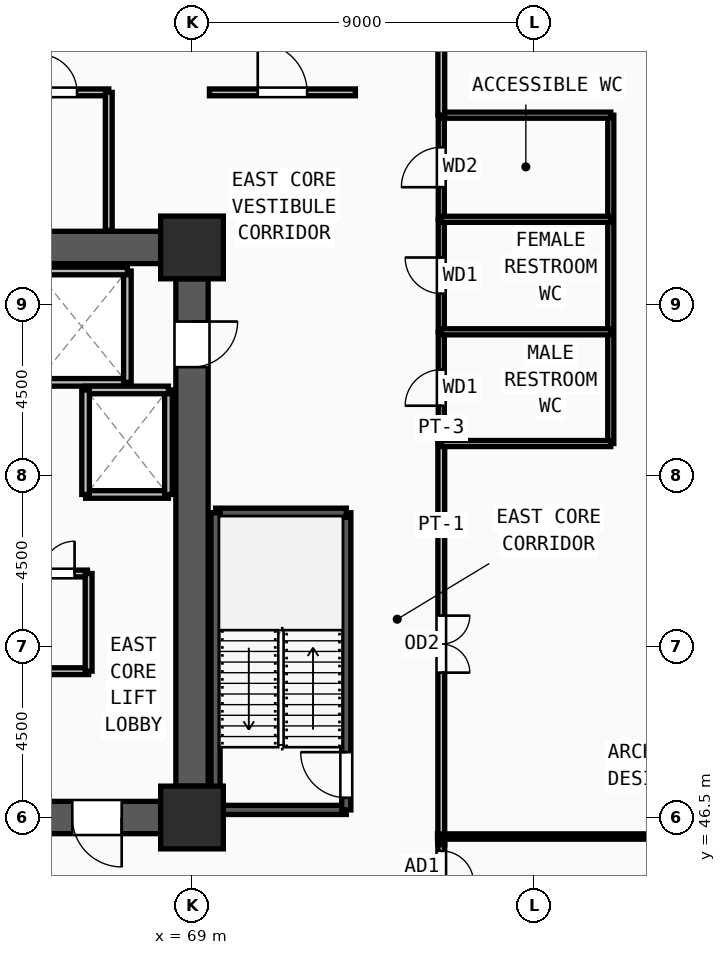
"""IFC4 building model, lengths in metres.
Left out: names, types, materials, properties, quantities, classifications, styles, units other than length and angle.
Written with IfcOpenShell. Run it as: python <this file> out.ifc"""

import sys

from ifc_helpers import new_model, si_unit, direction, frame, frame_2d, origin, origin_2d, place, context, subcontext, project, spatial, rectangle, extrude, source, transform, mapped, element, fill, save


model = new_model("IFC4")
c1 = context("Model", 3, precision=1e-05, world=origin(), true_north=direction((0.0, 1.0)))
c2 = subcontext(c1, "Body", "Model", "MODEL_VIEW")
j1 = project(units=[si_unit("LENGTHUNIT", "METRE"), si_unit("PLANEANGLEUNIT", "RADIAN")], contexts=[c1])
p1 = place(None, origin())
s1 = spatial("IfcSite", under=j1, at=p1, CompositionType="ELEMENT")
p2 = place(p1, origin())
s2 = spatial("IfcBuilding", under=s1, at=p2, CompositionType="ELEMENT")
p3 = place(p2, frame((0.0, 0.0, 63.0)))
s3 = spatial("IfcBuildingStorey", under=s2, at=p3, CompositionType="ELEMENT", Elevation=63.0)
m1 = source(origin(), c2, "Body", "SweptSolid", [
    extrude(rectangle(XDim=1.65, YDim=1.65, at=origin_2d()), origin(), (0.0, 0.0, 1.0), 3.75),
])
for number, where, z_axis, x_axis in (
    (1, (69.0, 46.5, 0.0), (0.0, 0.0, 1.0), (1.0, 0.0, 0.0)),
    (2, (69.0, 61.5, 0.0), (0.0, 0.0, 1.0), (1.0, 0.0, 0.0)),
):
    element("IfcColumn", number, at=place(p3, frame(where, z_axis=z_axis, x_axis=x_axis)), inside=s3, PredefinedType="COLUMN", context=c2, shape_type="MappedRepresentation", body=[
        mapped(m1, transform((0.0, 0.0, 0.0), x_axis=(1.0, 0.0, 0.0), y_axis=(0.0, 1.0, 0.0), z_axis=(0.0, 0.0, 1.0), scale=1.0)),
    ])
p4 = place(p3, frame((60.825, 61.5, 0.0), z_axis=(0.0, 0.0, 1.0), x_axis=(1.0, 0.0, 0.0)))
e3 = element("IfcWall", 3, at=p4, inside=s3, PredefinedType="SHEAR", context=c2, shape_type="SweptSolid", body=[
    extrude(rectangle(XDim=7.35, YDim=0.85, at=frame_2d((3.675, 0.0))), origin(), (0.0, 0.0, 1.0), 3.57),
])
p5 = place(p3, frame((69.0, 60.675, 0.0), z_axis=(0.0, 0.0, 1.0), x_axis=(0.0, -1.0, 0.0)))
e4 = element("IfcWall", 4, at=p5, inside=s3, PredefinedType="SHEAR", context=c2, shape_type="SweptSolid", body=[
    extrude(rectangle(XDim=13.35, YDim=0.85, at=frame_2d((6.675, 0.0))), origin(), (0.0, 0.0, 1.0), 3.57),
])
m2 = source(origin(), c2, "Body", "SweptSolid", [
    extrude(rectangle(XDim=1.2, YDim=2.2, at=frame_2d((0.6, 1.1))), frame((0.0, 0.435, 0.0), z_axis=(0.0, -1.0, 0.0), x_axis=(1.0, 0.0, 0.0)), (0.0, 0.0, 1.0), 0.87),
])
p6 = place(p5, frame((1.125, 0.0, 0.0)))
e5 = element("IfcOpeningElement", 5, at=p6, cuts=e4, PredefinedType="OPENING", context=c2, shape_type="MappedRepresentation", body=[
    mapped(m2, transform((0.0, 0.0, 0.0), x_axis=(1.0, 0.0, 0.0), y_axis=(0.0, 1.0, 0.0), z_axis=(0.0, 0.0, 1.0), scale=1.0)),
])
p7 = place(p3, frame((68.175, 46.5, 0.0), z_axis=(0.0, 0.0, 1.0), x_axis=(-1.0, 0.0, 0.0)))
e6 = element("IfcWall", 6, at=p7, inside=s3, PredefinedType="SHEAR", context=c2, shape_type="SweptSolid", body=[
    extrude(rectangle(XDim=7.35, YDim=0.85, at=frame_2d((3.675, 0.0))), origin(), (0.0, 0.0, 1.0), 3.57),
])
m3 = source(origin(), c2, "Body", "SweptSolid", [
    extrude(rectangle(XDim=1.3, YDim=2.2, at=frame_2d((0.65, 1.1))), frame((0.0, 0.435, 0.0), z_axis=(0.0, -1.0, 0.0), x_axis=(1.0, 0.0, 0.0)), (0.0, 0.0, 1.0), 0.87),
])
p8 = place(p7, frame((1.025, 0.0, 0.0)))
e7 = element("IfcOpeningElement", 7, at=p8, cuts=e6, PredefinedType="OPENING", context=c2, shape_type="MappedRepresentation", body=[
    mapped(m3, transform((0.0, 0.0, 0.0), x_axis=(1.0, 0.0, 0.0), y_axis=(0.0, 1.0, 0.0), z_axis=(0.0, 0.0, 1.0), scale=1.0)),
])
p9 = place(p3, frame((69.62, 46.7, 0.0), z_axis=(0.0, 0.0, 1.0), x_axis=(1.0, 0.0, 0.0)))
e8 = element("IfcWall", 8, at=p9, inside=s3, PredefinedType="SOLIDWALL", context=c2, shape_type="SweptSolid", body=[
    extrude(rectangle(XDim=3.44, YDim=0.24, at=frame_2d((1.72, 0.0))), origin(), (0.0, 0.0, 1.0), 3.57),
])
p10 = place(p3, frame((73.06, 46.7, 0.0), z_axis=(0.0, 0.0, 1.0), x_axis=(0.0, 1.0, 0.0)))
e9 = element("IfcWall", 9, at=p10, inside=s3, PredefinedType="SOLIDWALL", context=c2, shape_type="SweptSolid", body=[
    extrude(rectangle(XDim=7.82, YDim=0.24, at=frame_2d((3.91, 0.0))), origin(), (0.0, 0.0, 1.0), 3.57),
])
m4 = source(origin(), c2, "Body", "SweptSolid", [
    extrude(rectangle(XDim=1.2, YDim=2.2, at=frame_2d((0.6, 1.1))), frame((0.0, 0.13, 0.0), z_axis=(0.0, -1.0, 0.0), x_axis=(1.0, 0.0, 0.0)), (0.0, 0.0, 1.0), 0.26),
])
p11 = place(p10, frame((0.32, 0.0, 0.0)))
e10 = element("IfcOpeningElement", 10, at=p11, cuts=e9, PredefinedType="OPENING", context=c2, shape_type="MappedRepresentation", body=[
    mapped(m4, transform((0.0, 0.0, 0.0), x_axis=(1.0, 0.0, 0.0), y_axis=(0.0, 1.0, 0.0), z_axis=(0.0, 0.0, 1.0), scale=1.0)),
])
p12 = place(p3, frame((73.06, 54.52, 0.0), z_axis=(0.0, 0.0, 1.0), x_axis=(-1.0, 0.0, 0.0)))
e11 = element("IfcWall", 11, at=p12, inside=s3, PredefinedType="SOLIDWALL", context=c2, shape_type="SweptSolid", body=[
    extrude(rectangle(XDim=3.44, YDim=0.24, at=frame_2d((1.72, 0.0))), origin(), (0.0, 0.0, 1.0), 3.57),
])
p13 = place(p3, frame((69.62, 54.52, 0.0), z_axis=(0.0, 0.0, 1.0), x_axis=(0.0, -1.0, 0.0)))
e12 = element("IfcWall", 12, at=p13, inside=s3, PredefinedType="SOLIDWALL", context=c2, shape_type="SweptSolid", body=[
    extrude(rectangle(XDim=7.82, YDim=0.24, at=frame_2d((3.91, 0.0))), origin(), (0.0, 0.0, 1.0), 3.57),
])
p14 = place(p3, frame((64.9, 57.95, 0.0), z_axis=(0.0, 0.0, 1.0), x_axis=(1.0, 0.0, 0.0)))
e13 = element("IfcWall", 13, at=p14, inside=s3, PredefinedType="SOLIDWALL", context=c2, shape_type="SweptSolid", body=[
    extrude(rectangle(XDim=2.4, YDim=0.2, at=frame_2d((1.2, 0.0))), origin(), (0.0, 0.0, 1.0), 3.57),
])
p15 = place(p3, frame((67.3, 57.95, 0.0), z_axis=(0.0, 0.0, 1.0), x_axis=(0.0, 1.0, 0.0)))
e14 = element("IfcWall", 14, at=p15, inside=s3, PredefinedType="SOLIDWALL", context=c2, shape_type="SweptSolid", body=[
    extrude(rectangle(XDim=2.93, YDim=0.2, at=frame_2d((1.465, 0.0))), origin(), (0.0, 0.0, 1.0), 3.57),
])
p16 = place(p3, frame((67.3, 60.88, 0.0), z_axis=(0.0, 0.0, 1.0), x_axis=(-1.0, 0.0, 0.0)))
e15 = element("IfcWall", 15, at=p16, inside=s3, PredefinedType="SOLIDWALL", context=c2, shape_type="SweptSolid", body=[
    extrude(rectangle(XDim=2.4, YDim=0.2, at=frame_2d((1.2, 0.0))), origin(), (0.0, 0.0, 1.0), 3.57),
])
p17 = place(p3, frame((66.2, 55.0, 0.0), z_axis=(0.0, 0.0, 1.0), x_axis=(1.0, 0.0, 0.0)))
e16 = element("IfcWall", 16, at=p17, inside=s3, PredefinedType="SOLIDWALL", context=c2, shape_type="SweptSolid", body=[
    extrude(rectangle(XDim=2.18, YDim=0.2, at=frame_2d((1.09, 0.0))), origin(), (0.0, 0.0, 1.0), 3.57),
])
p18 = place(p3, frame((68.38, 55.0, 0.0), z_axis=(0.0, 0.0, 1.0), x_axis=(0.0, 1.0, 0.0)))
e17 = element("IfcWall", 17, at=p18, inside=s3, PredefinedType="SOLIDWALL", context=c2, shape_type="SweptSolid", body=[
    extrude(rectangle(XDim=2.75, YDim=0.2, at=frame_2d((1.375, 0.0))), origin(), (0.0, 0.0, 1.0), 3.57),
])
p19 = place(p3, frame((68.38, 57.75, 0.0), z_axis=(0.0, 0.0, 1.0), x_axis=(-1.0, 0.0, 0.0)))
e18 = element("IfcWall", 18, at=p19, inside=s3, PredefinedType="SOLIDWALL", context=c2, shape_type="SweptSolid", body=[
    extrude(rectangle(XDim=2.18, YDim=0.2, at=frame_2d((1.09, 0.0))), origin(), (0.0, 0.0, 1.0), 3.57),
])
p20 = place(p3, frame((66.2, 57.75, 0.0), z_axis=(0.0, 0.0, 1.0), x_axis=(0.0, -1.0, 0.0)))
e19 = element("IfcWall", 19, at=p20, inside=s3, PredefinedType="SOLIDWALL", context=c2, shape_type="SweptSolid", body=[
    extrude(rectangle(XDim=2.75, YDim=0.2, at=frame_2d((1.375, 0.0))), origin(), (0.0, 0.0, 1.0), 3.57),
])
p21 = place(p3, frame((64.72, 52.92, 0.0), z_axis=(0.0, 0.0, 1.0), x_axis=(1.0, 0.0, 0.0)))
e20 = element("IfcWall", 20, at=p21, inside=s3, PredefinedType="PARTITIONING", context=c2, shape_type="SweptSolid", body=[
    extrude(rectangle(XDim=1.53, YDim=0.18, at=frame_2d((0.765, 0.0))), origin(), (0.0, 0.0, 1.0), 3.57),
])
m5 = source(origin(), c2, "Body", "SweptSolid", [
    extrude(rectangle(XDim=0.85, YDim=2.1, at=frame_2d((0.425, 1.05))), frame((0.0, 0.1, 0.0), z_axis=(0.0, -1.0, 0.0), x_axis=(1.0, 0.0, 0.0)), (0.0, 0.0, 1.0), 0.2),
])
p22 = place(p21, frame((0.34, 0.0, 0.0)))
e21 = element("IfcOpeningElement", 21, at=p22, cuts=e20, PredefinedType="OPENING", context=c2, shape_type="MappedRepresentation", body=[
    mapped(m5, transform((0.0, 0.0, 0.0), x_axis=(1.0, 0.0, 0.0), y_axis=(0.0, 1.0, 0.0), z_axis=(0.0, 0.0, 1.0), scale=1.0)),
])
p23 = place(p3, frame((75.56, 56.34, 0.0), z_axis=(0.0, 0.0, 1.0), x_axis=(0.0, 1.0, 0.0)))
e22 = element("IfcWall", 22, at=p23, inside=s3, PredefinedType="PARTITIONING", context=c2, shape_type="SweptSolid", body=[
    extrude(rectangle(XDim=2.94, YDim=0.16, at=frame_2d((1.47, 0.0))), origin(), (0.0, 0.0, 1.0), 3.57),
])
m6 = source(origin(), c2, "Body", "SweptSolid", [
    extrude(rectangle(XDim=0.95, YDim=2.15, at=frame_2d((0.475, 1.075))), frame((0.0, 0.09, 0.0), z_axis=(0.0, -1.0, 0.0), x_axis=(1.0, 0.0, 0.0)), (0.0, 0.0, 1.0), 0.18),
])
p24 = place(p23, frame((0.995, 0.0, 0.0)))
e23 = element("IfcOpeningElement", 23, at=p24, cuts=e22, PredefinedType="OPENING", context=c2, shape_type="MappedRepresentation", body=[
    mapped(m6, transform((0.0, 0.0, 0.0), x_axis=(1.0, 0.0, 0.0), y_axis=(0.0, 1.0, 0.0), z_axis=(0.0, 0.0, 1.0), scale=1.0)),
])
p25 = place(p3, frame((75.56, 59.28, 0.0), z_axis=(0.0, 0.0, 1.0), x_axis=(0.0, 1.0, 0.0)))
e24 = element("IfcWall", 24, at=p25, inside=s3, PredefinedType="PARTITIONING", context=c2, shape_type="SweptSolid", body=[
    extrude(rectangle(XDim=2.96, YDim=0.16, at=frame_2d((1.48, 0.0))), origin(), (0.0, 0.0, 1.0), 3.57),
])
p26 = place(p25, frame((1.005, 0.0, 0.0)))
e25 = element("IfcOpeningElement", 25, at=p26, cuts=e24, PredefinedType="OPENING", context=c2, shape_type="MappedRepresentation", body=[
    mapped(m6, transform((0.0, 0.0, 0.0), x_axis=(1.0, 0.0, 0.0), y_axis=(0.0, 1.0, 0.0), z_axis=(0.0, 0.0, 1.0), scale=1.0)),
])
p27 = place(p3, frame((75.56, 62.24, 0.0), z_axis=(0.0, 0.0, 1.0), x_axis=(0.0, 1.0, 0.0)))
e26 = element("IfcWall", 26, at=p27, inside=s3, PredefinedType="PARTITIONING", context=c2, shape_type="SweptSolid", body=[
    extrude(rectangle(XDim=2.74, YDim=0.16, at=frame_2d((1.37, 0.0))), origin(), (0.0, 0.0, 1.0), 3.57),
])
m7 = source(origin(), c2, "Body", "SweptSolid", [
    extrude(rectangle(XDim=1.05, YDim=2.15, at=frame_2d((0.525, 1.075))), frame((0.0, 0.09, 0.0), z_axis=(0.0, -1.0, 0.0), x_axis=(1.0, 0.0, 0.0)), (0.0, 0.0, 1.0), 0.18),
])
p28 = place(p27, frame((0.845, 0.0, 0.0)))
e27 = element("IfcOpeningElement", 27, at=p28, cuts=e26, PredefinedType="OPENING", context=c2, shape_type="MappedRepresentation", body=[
    mapped(m7, transform((0.0, 0.0, 0.0), x_axis=(1.0, 0.0, 0.0), y_axis=(0.0, 1.0, 0.0), z_axis=(0.0, 0.0, 1.0), scale=1.0)),
])
p29 = place(p3, frame((64.14, 65.58, 0.0), z_axis=(0.0, 0.0, 1.0), x_axis=(1.0, 0.0, 0.0)))
e28 = element("IfcWall", 28, at=p29, inside=s3, PredefinedType="PARTITIONING", context=c2, shape_type="SweptSolid", body=[
    extrude(rectangle(XDim=2.67, YDim=0.18, at=frame_2d((1.335, 0.0))), origin(), (0.0, 0.0, 1.0), 3.57),
])
m8 = source(origin(), c2, "Body", "SweptSolid", [
    extrude(rectangle(XDim=1.0, YDim=2.2, at=frame_2d((0.5, 1.1))), frame((0.0, 0.1, 0.0), z_axis=(0.0, -1.0, 0.0), x_axis=(1.0, 0.0, 0.0)), (0.0, 0.0, 1.0), 0.2),
])
p30 = place(p29, frame((0.835, 0.0, 0.0)))
e29 = element("IfcOpeningElement", 29, at=p30, cuts=e28, PredefinedType="OPENING", context=c2, shape_type="MappedRepresentation", body=[
    mapped(m8, transform((0.0, 0.0, 0.0), x_axis=(1.0, 0.0, 0.0), y_axis=(0.0, 1.0, 0.0), z_axis=(0.0, 0.0, 1.0), scale=1.0)),
])
p31 = place(p3, frame((69.46, 65.58, 0.0), z_axis=(0.0, 0.0, 1.0), x_axis=(1.0, 0.0, 0.0)))
e30 = element("IfcWall", 30, at=p31, inside=s3, PredefinedType="PARTITIONING", context=c2, shape_type="SweptSolid", body=[
    extrude(rectangle(XDim=3.84, YDim=0.18, at=frame_2d((1.92, 0.0))), origin(), (0.0, 0.0, 1.0), 3.57),
])
m9 = source(origin(), c2, "Body", "SweptSolid", [
    extrude(rectangle(XDim=1.3, YDim=2.2, at=frame_2d((0.65, 1.1))), frame((0.0, 0.1, 0.0), z_axis=(0.0, -1.0, 0.0), x_axis=(1.0, 0.0, 0.0)), (0.0, 0.0, 1.0), 0.2),
])
p32 = place(p31, frame((1.27, 0.0, 0.0)))
e31 = element("IfcOpeningElement", 31, at=p32, cuts=e30, PredefinedType="OPENING", context=c2, shape_type="MappedRepresentation", body=[
    mapped(m9, transform((0.0, 0.0, 0.0), x_axis=(1.0, 0.0, 0.0), y_axis=(0.0, 1.0, 0.0), z_axis=(0.0, 0.0, 1.0), scale=1.0)),
])
p33 = place(p3, frame((75.56, 56.34, 0.0), z_axis=(0.0, 0.0, 1.0), x_axis=(0.0, -1.0, 0.0)))
e32 = element("IfcWall", 32, at=p33, inside=s3, PredefinedType="PARTITIONING", context=c2, shape_type="SweptSolid", body=[
    extrude(rectangle(XDim=10.555, YDim=0.18, at=frame_2d((5.278, 0.0))), origin(), (0.0, 0.0, 1.0), 3.57),
])
m10 = source(origin(), c2, "Body", "SweptSolid", [
    extrude(rectangle(XDim=1.5, YDim=2.2, at=frame_2d((0.75, 1.1))), frame((0.0, 0.1, 0.0), z_axis=(0.0, -1.0, 0.0), x_axis=(1.0, 0.0, 0.0)), (0.0, 0.0, 1.0), 0.2),
])
p34 = place(p33, frame((4.528, 0.0, 0.0)))
e33 = element("IfcOpeningElement", 33, at=p34, cuts=e32, PredefinedType="OPENING", context=c2, shape_type="MappedRepresentation", body=[
    mapped(m10, transform((0.0, 0.0, 0.0), x_axis=(1.0, 0.0, 0.0), y_axis=(0.0, 1.0, 0.0), z_axis=(0.0, 0.0, 1.0), scale=1.0)),
])
p35 = place(p3, frame((75.56, 45.785, 0.0), z_axis=(0.0, 0.0, 1.0), x_axis=(0.0, -1.0, 0.0)))
e34 = element("IfcWall", 34, at=p35, inside=s3, PredefinedType="PARTITIONING", context=c2, shape_type="SweptSolid", body=[
    extrude(rectangle(XDim=1.4, YDim=0.18, at=frame_2d((0.7, 0.0))), origin(), (0.0, 0.0, 1.0), 3.57),
])
p36 = place(p35, frame((0.163, 0.0, 0.0)))
e35 = element("IfcOpeningElement", 35, at=p36, cuts=e34, PredefinedType="OPENING", context=c2, shape_type="MappedRepresentation", body=[
    mapped(m5, transform((0.0, 0.0, 0.0), x_axis=(1.0, 0.0, 0.0), y_axis=(0.0, 1.0, 0.0), z_axis=(0.0, 0.0, 1.0), scale=1.0)),
])
p37 = place(p3, frame((64.69, 50.35, 0.0), z_axis=(0.0, 0.0, 1.0), x_axis=(1.0, 0.0, 0.0)))
e36 = element("IfcWall", 36, at=p37, inside=s3, PredefinedType="PARTITIONING", context=c2, shape_type="SweptSolid", body=[
    extrude(rectangle(XDim=1.59, YDim=0.18, at=frame_2d((0.795, 0.0))), origin(), (0.0, 0.0, 1.0), 3.57),
])
p38 = place(p3, frame((66.28, 50.35, 0.0), z_axis=(0.0, 0.0, 1.0), x_axis=(0.0, 1.0, 0.0)))
e37 = element("IfcWall", 37, at=p38, inside=s3, PredefinedType="PARTITIONING", context=c2, shape_type="SweptSolid", body=[
    extrude(rectangle(XDim=2.57, YDim=0.18, at=frame_2d((1.285, 0.0))), origin(), (0.0, 0.0, 1.0), 3.57),
])
p39 = place(p3, frame((80.02, 56.34, 0.0), z_axis=(0.0, 0.0, 1.0), x_axis=(0.0, 1.0, 0.0)))
e38 = element("IfcWall", 38, at=p39, inside=s3, PredefinedType="PARTITIONING", context=c2, shape_type="SweptSolid", body=[
    extrude(rectangle(XDim=8.64, YDim=0.16, at=frame_2d((4.32, 0.0))), origin(), (0.0, 0.0, 1.0), 3.57),
])
for number, where, z_axis, x_axis in (
    (39, (75.56, 56.34, 0.0), (0.0, 0.0, 1.0), (1.0, 0.0, 0.0)),
    (40, (75.56, 59.28, 0.0), (0.0, 0.0, 1.0), (1.0, 0.0, 0.0)),
    (41, (75.56, 62.24, 0.0), (0.0, 0.0, 1.0), (1.0, 0.0, 0.0)),
    (42, (75.56, 64.98, 0.0), (0.0, 0.0, 1.0), (1.0, 0.0, 0.0)),
):
    element("IfcWall", number, at=place(p3, frame(where, z_axis=z_axis, x_axis=x_axis)), inside=s3, PredefinedType="PARTITIONING", context=c2, shape_type="SweptSolid", body=[
        extrude(rectangle(XDim=4.46, YDim=0.16, at=frame_2d((2.23, 0.0))), origin(), (0.0, 0.0, 1.0), 3.57),
    ])
p40 = place(p3, frame((66.81, 61.95, 0.0), z_axis=(0.0, 0.0, 1.0), x_axis=(0.0, 1.0, 0.0)))
e43 = element("IfcWall", 43, at=p40, inside=s3, PredefinedType="PARTITIONING", context=c2, shape_type="SweptSolid", body=[
    extrude(rectangle(XDim=3.63, YDim=0.18, at=frame_2d((1.815, 0.0))), origin(), (0.0, 0.0, 1.0), 3.57),
])
p41 = place(p3, frame((75.56, 67.215, 0.0), z_axis=(0.0, 0.0, 1.0), x_axis=(0.0, -1.0, 0.0)))
e44 = element("IfcWall", 44, at=p41, inside=s3, PredefinedType="PARTITIONING", context=c2, shape_type="SweptSolid", body=[
    extrude(rectangle(XDim=2.235, YDim=0.18, at=frame_2d((1.118, 0.0))), origin(), (0.0, 0.0, 1.0), 3.57),
])
p42 = place(p3, frame((75.46, 46.0, 0.0), z_axis=(0.0, 0.0, 1.0), x_axis=(1.0, 0.0, 0.0)))
e45 = element("IfcWall", 45, at=p42, inside=s3, PredefinedType="PARTITIONING", context=c2, shape_type="SweptSolid", body=[
    extrude(rectangle(XDim=12.255, YDim=0.14, at=frame_2d((6.127, 0.0))), origin(), (0.0, 0.0, 1.0), 3.57),
])
m11 = source(origin(), c2, "Body", "SweptSolid", [
    extrude(rectangle(XDim=1.3, YDim=2.2, at=frame_2d((0.65, 1.1))), frame((0.0, 0.025, 0.0), z_axis=(0.0, -1.0, 0.0), x_axis=(1.0, 0.0, 0.0)), (0.0, 0.0, 1.0), 0.05),
])
p43 = place(p8, origin())
e46 = element("IfcDoor", 46, at=p43, inside=s3, OperationType="SINGLE_SWING_LEFT", PredefinedType="DOOR", context=c2, shape_type="MappedRepresentation", body=[
    mapped(m11, transform((0.0, 0.0, 0.0), x_axis=(1.0, 0.0, 0.0), y_axis=(0.0, 1.0, 0.0), z_axis=(0.0, 0.0, 1.0), scale=1.0)),
])
fill(e7, e46)
m12 = source(origin(), c2, "Body", "SweptSolid", [
    extrude(rectangle(XDim=1.2, YDim=2.2, at=frame_2d((0.6, 1.1))), frame((0.0, 0.025, 0.0), z_axis=(0.0, -1.0, 0.0), x_axis=(1.0, 0.0, 0.0)), (0.0, 0.0, 1.0), 0.05),
])
p44 = place(p6, origin())
e47 = element("IfcDoor", 47, at=p44, inside=s3, OperationType="SINGLE_SWING_LEFT", PredefinedType="DOOR", context=c2, shape_type="MappedRepresentation", body=[
    mapped(m12, transform((0.0, 0.0, 0.0), x_axis=(1.0, 0.0, 0.0), y_axis=(0.0, 1.0, 0.0), z_axis=(0.0, 0.0, 1.0), scale=1.0)),
])
fill(e5, e47)
p45 = place(p11, origin())
e48 = element("IfcDoor", 48, at=p45, inside=s3, OperationType="SINGLE_SWING_RIGHT", PredefinedType="DOOR", context=c2, shape_type="MappedRepresentation", body=[
    mapped(m12, transform((0.0, 0.0, 0.0), x_axis=(1.0, 0.0, 0.0), y_axis=(0.0, 1.0, 0.0), z_axis=(0.0, 0.0, 1.0), scale=1.0)),
])
fill(e10, e48)
m13 = source(origin(), c2, "Body", "SweptSolid", [
    extrude(rectangle(XDim=0.85, YDim=2.1, at=frame_2d((0.425, 1.05))), frame((0.0, 0.025, 0.0), z_axis=(0.0, -1.0, 0.0), x_axis=(1.0, 0.0, 0.0)), (0.0, 0.0, 1.0), 0.05),
])
p46 = place(p22, origin())
e49 = element("IfcDoor", 49, at=p46, inside=s3, OperationType="SINGLE_SWING_RIGHT", PredefinedType="DOOR", context=c2, shape_type="MappedRepresentation", body=[
    mapped(m13, transform((0.0, 0.0, 0.0), x_axis=(1.0, 0.0, 0.0), y_axis=(0.0, 1.0, 0.0), z_axis=(0.0, 0.0, 1.0), scale=1.0)),
])
fill(e21, e49)
m14 = source(origin(), c2, "Body", "SweptSolid", [
    extrude(rectangle(XDim=0.95, YDim=2.15, at=frame_2d((0.475, 1.075))), frame((0.0, 0.025, 0.0), z_axis=(0.0, -1.0, 0.0), x_axis=(1.0, 0.0, 0.0)), (0.0, 0.0, 1.0), 0.05),
])
p47 = place(p24, origin())
e50 = element("IfcDoor", 50, at=p47, inside=s3, OperationType="SINGLE_SWING_LEFT", PredefinedType="DOOR", context=c2, shape_type="MappedRepresentation", body=[
    mapped(m14, transform((0.0, 0.0, 0.0), x_axis=(1.0, 0.0, 0.0), y_axis=(0.0, 1.0, 0.0), z_axis=(0.0, 0.0, 1.0), scale=1.0)),
])
fill(e23, e50)
p48 = place(p26, origin())
e51 = element("IfcDoor", 51, at=p48, inside=s3, OperationType="SINGLE_SWING_RIGHT", PredefinedType="DOOR", context=c2, shape_type="MappedRepresentation", body=[
    mapped(m14, transform((0.0, 0.0, 0.0), x_axis=(1.0, 0.0, 0.0), y_axis=(0.0, 1.0, 0.0), z_axis=(0.0, 0.0, 1.0), scale=1.0)),
])
fill(e25, e51)
m15 = source(origin(), c2, "Body", "SweptSolid", [
    extrude(rectangle(XDim=1.05, YDim=2.15, at=frame_2d((0.525, 1.075))), frame((0.0, 0.025, 0.0), z_axis=(0.0, -1.0, 0.0), x_axis=(1.0, 0.0, 0.0)), (0.0, 0.0, 1.0), 0.05),
])
p49 = place(p28, origin())
e52 = element("IfcDoor", 52, at=p49, inside=s3, OperationType="SINGLE_SWING_LEFT", PredefinedType="DOOR", context=c2, shape_type="MappedRepresentation", body=[
    mapped(m15, transform((0.0, 0.0, 0.0), x_axis=(1.0, 0.0, 0.0), y_axis=(0.0, 1.0, 0.0), z_axis=(0.0, 0.0, 1.0), scale=1.0)),
])
fill(e27, e52)
m16 = source(origin(), c2, "Body", "SweptSolid", [
    extrude(rectangle(XDim=1.0, YDim=2.2, at=frame_2d((0.5, 1.1))), frame((0.0, 0.025, 0.0), z_axis=(0.0, -1.0, 0.0), x_axis=(1.0, 0.0, 0.0)), (0.0, 0.0, 1.0), 0.05),
])
p50 = place(p30, origin())
e53 = element("IfcDoor", 53, at=p50, inside=s3, OperationType="SINGLE_SWING_LEFT", PredefinedType="DOOR", context=c2, shape_type="MappedRepresentation", body=[
    mapped(m16, transform((0.0, 0.0, 0.0), x_axis=(1.0, 0.0, 0.0), y_axis=(0.0, 1.0, 0.0), z_axis=(0.0, 0.0, 1.0), scale=1.0)),
])
fill(e29, e53)
p51 = place(p32, origin())
e54 = element("IfcDoor", 54, at=p51, inside=s3, OperationType="SINGLE_SWING_LEFT", PredefinedType="DOOR", context=c2, shape_type="MappedRepresentation", body=[
    mapped(m11, transform((0.0, 0.0, 0.0), x_axis=(1.0, 0.0, 0.0), y_axis=(0.0, 1.0, 0.0), z_axis=(0.0, 0.0, 1.0), scale=1.0)),
])
fill(e31, e54)
m17 = source(origin(), c2, "Body", "SweptSolid", [
    extrude(rectangle(XDim=1.5, YDim=2.2, at=frame_2d((0.75, 1.1))), frame((0.0, 0.025, 0.0), z_axis=(0.0, -1.0, 0.0), x_axis=(1.0, 0.0, 0.0)), (0.0, 0.0, 1.0), 0.05),
])
p52 = place(p34, origin())
e55 = element("IfcDoor", 55, at=p52, inside=s3, OperationType="DOUBLE_DOOR_SINGLE_SWING", PredefinedType="DOOR", context=c2, shape_type="MappedRepresentation", body=[
    mapped(m17, transform((0.0, 0.0, 0.0), x_axis=(1.0, 0.0, 0.0), y_axis=(0.0, 1.0, 0.0), z_axis=(0.0, 0.0, 1.0), scale=1.0)),
])
fill(e33, e55)
p53 = place(p36, origin())
e56 = element("IfcDoor", 56, at=p53, inside=s3, OperationType="SINGLE_SWING_RIGHT", PredefinedType="DOOR", context=c2, shape_type="MappedRepresentation", body=[
    mapped(m13, transform((0.0, 0.0, 0.0), x_axis=(1.0, 0.0, 0.0), y_axis=(0.0, 1.0, 0.0), z_axis=(0.0, 0.0, 1.0), scale=1.0)),
])
fill(e35, e56)
save(model, sys.argv[1])
